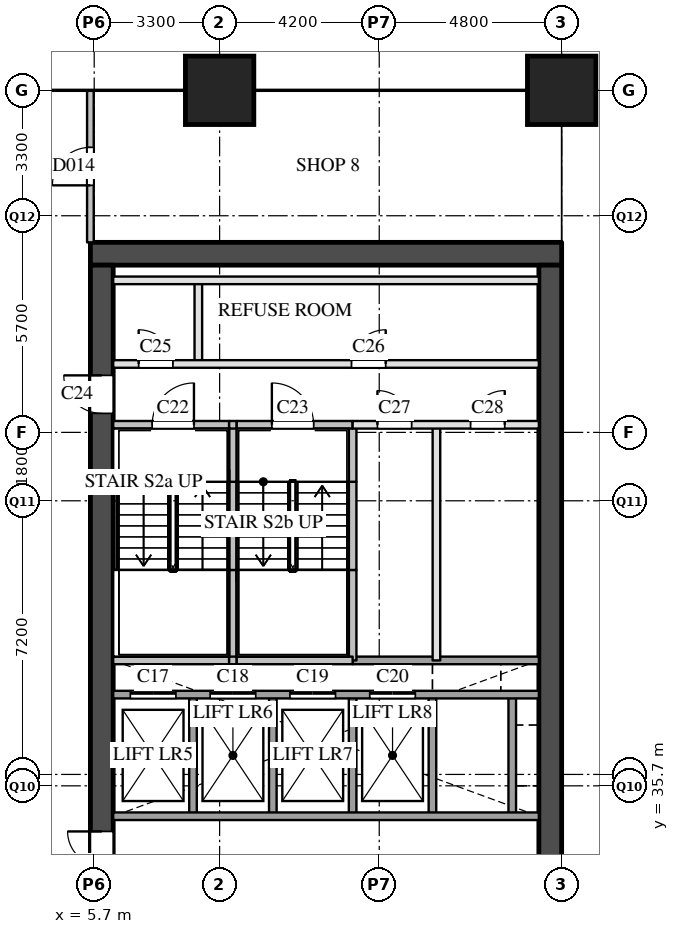
"""IFC4 building model, lengths in metres.
Left out: names, types, materials, properties, quantities, classifications, styles, units other than length and angle.
Written with IfcOpenShell. Run it as: python <this file> out.ifc"""

import sys

from ifc_helpers import new_model, si_unit, direction, frame, frame_2d, origin, origin_2d, place, context, subcontext, project, spatial, rectangle, extrude, element, fill, save


model = new_model("IFC4")
c1 = context("Model", 3, precision=1e-05, world=origin(), true_north=direction((0.0, 1.0)))
c2 = subcontext(c1, "Body", "Model", "MODEL_VIEW")
j1 = project(units=[si_unit("LENGTHUNIT", "METRE"), si_unit("PLANEANGLEUNIT", "RADIAN")], contexts=[c1])
p1 = place(None, origin())
s1 = spatial("IfcSite", under=j1, at=p1, CompositionType="ELEMENT")
p2 = place(p1, origin())
s2 = spatial("IfcBuilding", under=s1, at=p2, CompositionType="ELEMENT")
p3 = place(p2, frame((0.0, 0.0, 8.0)))
s3 = spatial("IfcBuildingStorey", under=s2, at=p3, CompositionType="ELEMENT", Elevation=8.0)
for number, where, z_axis, x_axis in (
    (1, (9.0, 54.0, 0.0), (0.0, 0.0, 1.0), (1.0, 0.0, 0.0)),
    (2, (18.0, 54.0, 0.0), (0.0, 0.0, 1.0), (1.0, 0.0, 0.0)),
):
    element("IfcColumn", number, at=place(p3, frame(where, z_axis=z_axis, x_axis=x_axis)), inside=s3, PredefinedType="COLUMN", context=c2, shape_type="SweptSolid", body=[
        extrude(rectangle(XDim=1.8, YDim=1.8, at=origin_2d()), origin(), (0.0, 0.0, 1.0), 6.0),
    ])
p4 = place(p3, frame((5.6, 49.7, 0.0), z_axis=(0.0, 0.0, 1.0), x_axis=(1.0, 0.0, 0.0)))
e3 = element("IfcWall", 3, at=p4, inside=s3, PredefinedType="SHEAR", context=c2, shape_type="SweptSolid", body=[
    extrude(rectangle(XDim=12.4, YDim=0.6, at=frame_2d((6.2, 0.0))), origin(), (0.0, 0.0, 1.0), 5.59),
])
p5 = place(p3, frame((5.9, 29.1, 0.0), z_axis=(0.0, 0.0, 1.0), x_axis=(0.0, 1.0, 0.0)))
e4 = element("IfcWall", 4, at=p5, inside=s3, PredefinedType="SHEAR", context=c2, shape_type="SweptSolid", body=[
    extrude(rectangle(XDim=20.3, YDim=0.6, at=frame_2d((10.15, 0.0))), origin(), (0.0, 0.0, 1.0), 5.59),
])
p6 = place(p5, frame((3.6, 0.0, 0.0)))
e5 = element("IfcOpeningElement", 5, at=p6, cuts=e4, PredefinedType="OPENING", context=c2, shape_type="SweptSolid", body=[
    extrude(rectangle(XDim=1.8, YDim=2.1, at=frame_2d((0.9, 1.05))), frame((0.0, 0.31, 0.0), z_axis=(0.0, -1.0, 0.0), x_axis=(1.0, 0.0, 0.0)), (0.0, 0.0, 1.0), 0.62),
])
p7 = place(p5, frame((16.4, 0.0, 0.0)))
e6 = element("IfcOpeningElement", 6, at=p7, cuts=e4, PredefinedType="OPENING", context=c2, shape_type="SweptSolid", body=[
    extrude(rectangle(XDim=1.0, YDim=2.1, at=frame_2d((0.5, 1.05))), frame((0.0, 0.31, 0.0), z_axis=(0.0, -1.0, 0.0), x_axis=(1.0, 0.0, 0.0)), (0.0, 0.0, 1.0), 0.62),
])
p8 = place(p3, frame((17.7, 29.1, 0.0), z_axis=(0.0, 0.0, 1.0), x_axis=(0.0, 1.0, 0.0)))
e7 = element("IfcWall", 7, at=p8, inside=s3, PredefinedType="SHEAR", context=c2, shape_type="SweptSolid", body=[
    extrude(rectangle(XDim=20.3, YDim=0.6, at=frame_2d((10.15, 0.0))), origin(), (0.0, 0.0, 1.0), 5.59),
])
p9 = place(p3, frame((8.3, 34.9, 0.0), z_axis=(0.0, 0.0, 1.0), x_axis=(0.0, 1.0, 0.0)))
e8 = element("IfcWall", 8, at=p9, inside=s3, PredefinedType="SOLIDWALL", context=c2, shape_type="SweptSolid", body=[
    extrude(rectangle(XDim=3.2, YDim=0.2, at=frame_2d((1.6, 0.0))), origin(), (0.0, 0.0, 1.0), 5.59),
])
p10 = place(p3, frame((8.44, 46.8, 0.0), z_axis=(0.0, 0.0, 1.0), x_axis=(0.0, 1.0, 0.0)))
e9 = element("IfcWall", 9, at=p10, inside=s3, PredefinedType="PARTITIONING", context=c2, shape_type="SweptSolid", body=[
    extrude(rectangle(XDim=2.2, YDim=0.2, at=frame_2d((1.1, 0.0))), origin(), (0.0, 0.0, 1.0), 5.59),
])
p11 = place(p3, frame((9.35, 39.0, 0.0), z_axis=(0.0, 0.0, 1.0), x_axis=(0.0, 1.0, 0.0)))
e10 = element("IfcWall", 10, at=p11, inside=s3, PredefinedType="SOLIDWALL", context=c2, shape_type="SweptSolid", body=[
    extrude(rectangle(XDim=2.38, YDim=0.2, at=frame_2d((1.19, 0.0))), origin(), (0.0, 0.0, 1.0), 5.59),
])
p12 = place(p3, frame((9.35, 41.38, 0.0), z_axis=(0.0, 0.0, 1.0), x_axis=(0.0, 1.0, 0.0)))
e11 = element("IfcWall", 11, at=p12, inside=s3, PredefinedType="SOLIDWALL", context=c2, shape_type="SweptSolid", body=[
    extrude(rectangle(XDim=2.32, YDim=0.2, at=frame_2d((1.16, 0.0))), origin(), (0.0, 0.0, 1.0), 5.59),
])
p13 = place(p3, frame((9.35, 43.7, 0.0), z_axis=(0.0, 0.0, 1.0), x_axis=(0.0, 1.0, 0.0)))
e12 = element("IfcWall", 12, at=p13, inside=s3, PredefinedType="SOLIDWALL", context=c2, shape_type="SweptSolid", body=[
    extrude(rectangle(XDim=1.5, YDim=0.2, at=frame_2d((0.75, 0.0))), origin(), (0.0, 0.0, 1.0), 5.59),
])
for number, where, z_axis, x_axis in (
    (13, (10.4, 34.9, 0.0), (0.0, 0.0, 1.0), (0.0, 1.0, 0.0)),
    (14, (12.5, 34.9, 0.0), (0.0, 0.0, 1.0), (0.0, 1.0, 0.0)),
):
    element("IfcWall", number, at=place(p3, frame(where, z_axis=z_axis, x_axis=x_axis)), inside=s3, PredefinedType="SOLIDWALL", context=c2, shape_type="SweptSolid", body=[
        extrude(rectangle(XDim=3.2, YDim=0.2, at=frame_2d((1.6, 0.0))), origin(), (0.0, 0.0, 1.0), 5.59),
    ])
p14 = place(p3, frame((12.5, 39.0, 0.0), z_axis=(0.0, 0.0, 1.0), x_axis=(0.0, 1.0, 0.0)))
e15 = element("IfcWall", 15, at=p14, inside=s3, PredefinedType="SOLIDWALL", context=c2, shape_type="SweptSolid", body=[
    extrude(rectangle(XDim=2.38, YDim=0.2, at=frame_2d((1.19, 0.0))), origin(), (0.0, 0.0, 1.0), 5.59),
])
p15 = place(p3, frame((12.5, 41.38, 0.0), z_axis=(0.0, 0.0, 1.0), x_axis=(0.0, 1.0, 0.0)))
e16 = element("IfcWall", 16, at=p15, inside=s3, PredefinedType="SOLIDWALL", context=c2, shape_type="SweptSolid", body=[
    extrude(rectangle(XDim=2.32, YDim=0.2, at=frame_2d((1.16, 0.0))), origin(), (0.0, 0.0, 1.0), 5.59),
])
p16 = place(p3, frame((12.5, 43.7, 0.0), z_axis=(0.0, 0.0, 1.0), x_axis=(0.0, 1.0, 0.0)))
e17 = element("IfcWall", 17, at=p16, inside=s3, PredefinedType="SOLIDWALL", context=c2, shape_type="SweptSolid", body=[
    extrude(rectangle(XDim=1.5, YDim=0.2, at=frame_2d((0.75, 0.0))), origin(), (0.0, 0.0, 1.0), 5.59),
])
p17 = place(p3, frame((14.6, 34.9, 0.0), z_axis=(0.0, 0.0, 1.0), x_axis=(0.0, 1.0, 0.0)))
e18 = element("IfcWall", 18, at=p17, inside=s3, PredefinedType="SOLIDWALL", context=c2, shape_type="SweptSolid", body=[
    extrude(rectangle(XDim=3.2, YDim=0.2, at=frame_2d((1.6, 0.0))), origin(), (0.0, 0.0, 1.0), 5.59),
])
p18 = place(p3, frame((14.705, 39.0, 0.0), z_axis=(0.0, 0.0, 1.0), x_axis=(0.0, 1.0, 0.0)))
e19 = element("IfcWall", 19, at=p18, inside=s3, PredefinedType="PARTITIONING", context=c2, shape_type="SweptSolid", body=[
    extrude(rectangle(XDim=6.2, YDim=0.2, at=frame_2d((3.1, 0.0))), origin(), (0.0, 0.0, 1.0), 5.59),
])
p19 = place(p3, frame((16.7, 34.9, 0.0), z_axis=(0.0, 0.0, 1.0), x_axis=(0.0, 1.0, 0.0)))
e20 = element("IfcWall", 20, at=p19, inside=s3, PredefinedType="SOLIDWALL", context=c2, shape_type="SweptSolid", body=[
    extrude(rectangle(XDim=3.2, YDim=0.2, at=frame_2d((1.6, 0.0))), origin(), (0.0, 0.0, 1.0), 5.59),
])
p20 = place(p3, frame((6.2, 34.9, 0.0), z_axis=(0.0, 0.0, 1.0), x_axis=(1.0, 0.0, 0.0)))
e21 = element("IfcWall", 21, at=p20, inside=s3, PredefinedType="SOLIDWALL", context=c2, shape_type="SweptSolid", body=[
    extrude(rectangle(XDim=11.2, YDim=0.2, at=frame_2d((5.6, 0.0))), origin(), (0.0, 0.0, 1.0), 5.59),
])
p21 = place(p3, frame((6.2, 38.1, 0.0), z_axis=(0.0, 0.0, 1.0), x_axis=(1.0, 0.0, 0.0)))
e22 = element("IfcWall", 22, at=p21, inside=s3, PredefinedType="SOLIDWALL", context=c2, shape_type="SweptSolid", body=[
    extrude(rectangle(XDim=11.2, YDim=0.2, at=frame_2d((5.6, 0.0))), origin(), (0.0, 0.0, 1.0), 5.59),
])
p22 = place(p21, frame((0.45, 0.0, 0.0)))
e23 = element("IfcOpeningElement", 23, at=p22, cuts=e22, PredefinedType="OPENING", context=c2, shape_type="SweptSolid", body=[
    extrude(rectangle(XDim=1.2, YDim=2.1, at=frame_2d((0.6, 1.05))), frame((0.0, 0.11, 0.0), z_axis=(0.0, -1.0, 0.0), x_axis=(1.0, 0.0, 0.0)), (0.0, 0.0, 1.0), 0.22),
])
p23 = place(p21, frame((2.55, 0.0, 0.0)))
e24 = element("IfcOpeningElement", 24, at=p23, cuts=e22, PredefinedType="OPENING", context=c2, shape_type="SweptSolid", body=[
    extrude(rectangle(XDim=1.2, YDim=2.1, at=frame_2d((0.6, 1.05))), frame((0.0, 0.11, 0.0), z_axis=(0.0, -1.0, 0.0), x_axis=(1.0, 0.0, 0.0)), (0.0, 0.0, 1.0), 0.22),
])
p24 = place(p21, frame((4.65, 0.0, 0.0)))
e25 = element("IfcOpeningElement", 25, at=p24, cuts=e22, PredefinedType="OPENING", context=c2, shape_type="SweptSolid", body=[
    extrude(rectangle(XDim=1.2, YDim=2.1, at=frame_2d((0.6, 1.05))), frame((0.0, 0.11, 0.0), z_axis=(0.0, -1.0, 0.0), x_axis=(1.0, 0.0, 0.0)), (0.0, 0.0, 1.0), 0.22),
])
p25 = place(p21, frame((6.75, 0.0, 0.0)))
e26 = element("IfcOpeningElement", 26, at=p25, cuts=e22, PredefinedType="OPENING", context=c2, shape_type="SweptSolid", body=[
    extrude(rectangle(XDim=1.2, YDim=2.1, at=frame_2d((0.6, 1.05))), frame((0.0, 0.11, 0.0), z_axis=(0.0, -1.0, 0.0), x_axis=(1.0, 0.0, 0.0)), (0.0, 0.0, 1.0), 0.22),
])
p26 = place(p3, frame((12.5, 39.0, 0.0), z_axis=(0.0, 0.0, 1.0), x_axis=(1.0, 0.0, 0.0)))
e27 = element("IfcWall", 27, at=p26, inside=s3, PredefinedType="SOLIDWALL", context=c2, shape_type="SweptSolid", body=[
    extrude(rectangle(XDim=4.9, YDim=0.2, at=frame_2d((2.45, 0.0))), origin(), (0.0, 0.0, 1.0), 5.59),
])
p27 = place(p3, frame((6.2, 39.0, 0.0), z_axis=(0.0, 0.0, 1.0), x_axis=(1.0, 0.0, 0.0)))
e28 = element("IfcWall", 28, at=p27, inside=s3, PredefinedType="SOLIDWALL", context=c2, shape_type="SweptSolid", body=[
    extrude(rectangle(XDim=3.05, YDim=0.2, at=frame_2d((1.525, 0.0))), origin(), (0.0, 0.0, 1.0), 5.59),
])
p28 = place(p3, frame((9.25, 39.0, 0.0), z_axis=(0.0, 0.0, 1.0), x_axis=(1.0, 0.0, 0.0)))
e29 = element("IfcWall", 29, at=p28, inside=s3, PredefinedType="SOLIDWALL", context=c2, shape_type="SweptSolid", body=[
    extrude(rectangle(XDim=0.2, YDim=0.2, at=frame_2d((0.1, 0.0))), origin(), (0.0, 0.0, 1.0), 5.59),
])
p29 = place(p3, frame((9.45, 39.0, 0.0), z_axis=(0.0, 0.0, 1.0), x_axis=(1.0, 0.0, 0.0)))
e30 = element("IfcWall", 30, at=p29, inside=s3, PredefinedType="SOLIDWALL", context=c2, shape_type="SweptSolid", body=[
    extrude(rectangle(XDim=3.05, YDim=0.2, at=frame_2d((1.525, 0.0))), origin(), (0.0, 0.0, 1.0), 5.59),
])
p30 = place(p3, frame((12.5, 45.2, 0.0), z_axis=(0.0, 0.0, 1.0), x_axis=(1.0, 0.0, 0.0)))
e31 = element("IfcWall", 31, at=p30, inside=s3, PredefinedType="PARTITIONING", context=c2, shape_type="SweptSolid", body=[
    extrude(rectangle(XDim=4.9, YDim=0.2, at=frame_2d((2.45, 0.0))), origin(), (0.0, 0.0, 1.0), 5.59),
])
p31 = place(p30, frame((0.653, 0.0, 0.0)))
e32 = element("IfcOpeningElement", 32, at=p31, cuts=e31, PredefinedType="OPENING", context=c2, shape_type="SweptSolid", body=[
    extrude(rectangle(XDim=0.9, YDim=2.1, at=frame_2d((0.45, 1.05))), frame((0.0, 0.11, 0.0), z_axis=(0.0, -1.0, 0.0), x_axis=(1.0, 0.0, 0.0)), (0.0, 0.0, 1.0), 0.22),
])
p32 = place(p30, frame((3.103, 0.0, 0.0)))
e33 = element("IfcOpeningElement", 33, at=p32, cuts=e31, PredefinedType="OPENING", context=c2, shape_type="SweptSolid", body=[
    extrude(rectangle(XDim=0.9, YDim=2.1, at=frame_2d((0.45, 1.05))), frame((0.0, 0.11, 0.0), z_axis=(0.0, -1.0, 0.0), x_axis=(1.0, 0.0, 0.0)), (0.0, 0.0, 1.0), 0.22),
])
p33 = place(p3, frame((6.2, 45.2, 0.0), z_axis=(0.0, 0.0, 1.0), x_axis=(1.0, 0.0, 0.0)))
e34 = element("IfcWall", 34, at=p33, inside=s3, PredefinedType="SOLIDWALL", context=c2, shape_type="SweptSolid", body=[
    extrude(rectangle(XDim=3.05, YDim=0.2, at=frame_2d((1.525, 0.0))), origin(), (0.0, 0.0, 1.0), 5.59),
])
p34 = place(p33, frame((1.025, 0.0, 0.0)))
e35 = element("IfcOpeningElement", 35, at=p34, cuts=e34, PredefinedType="OPENING", context=c2, shape_type="SweptSolid", body=[
    extrude(rectangle(XDim=1.1, YDim=2.1, at=frame_2d((0.55, 1.05))), frame((0.0, 0.11, 0.0), z_axis=(0.0, -1.0, 0.0), x_axis=(1.0, 0.0, 0.0)), (0.0, 0.0, 1.0), 0.22),
])
p35 = place(p3, frame((9.25, 45.2, 0.0), z_axis=(0.0, 0.0, 1.0), x_axis=(1.0, 0.0, 0.0)))
e36 = element("IfcWall", 36, at=p35, inside=s3, PredefinedType="SOLIDWALL", context=c2, shape_type="SweptSolid", body=[
    extrude(rectangle(XDim=0.2, YDim=0.2, at=frame_2d((0.1, 0.0))), origin(), (0.0, 0.0, 1.0), 5.59),
])
p36 = place(p3, frame((9.45, 45.2, 0.0), z_axis=(0.0, 0.0, 1.0), x_axis=(1.0, 0.0, 0.0)))
e37 = element("IfcWall", 37, at=p36, inside=s3, PredefinedType="SOLIDWALL", context=c2, shape_type="SweptSolid", body=[
    extrude(rectangle(XDim=3.05, YDim=0.2, at=frame_2d((1.525, 0.0))), origin(), (0.0, 0.0, 1.0), 5.59),
])
p37 = place(p36, frame((0.925, 0.0, 0.0)))
e38 = element("IfcOpeningElement", 38, at=p37, cuts=e37, PredefinedType="OPENING", context=c2, shape_type="SweptSolid", body=[
    extrude(rectangle(XDim=1.1, YDim=2.1, at=frame_2d((0.55, 1.05))), frame((0.0, 0.11, 0.0), z_axis=(0.0, -1.0, 0.0), x_axis=(1.0, 0.0, 0.0)), (0.0, 0.0, 1.0), 0.22),
])
p38 = place(p3, frame((6.2, 46.8, 0.0), z_axis=(0.0, 0.0, 1.0), x_axis=(1.0, 0.0, 0.0)))
e39 = element("IfcWall", 39, at=p38, inside=s3, PredefinedType="PARTITIONING", context=c2, shape_type="SweptSolid", body=[
    extrude(rectangle(XDim=11.2, YDim=0.2, at=frame_2d((5.6, 0.0))), origin(), (0.0, 0.0, 1.0), 5.59),
])
p39 = place(p38, frame((0.67, 0.0, 0.0)))
e40 = element("IfcOpeningElement", 40, at=p39, cuts=e39, PredefinedType="OPENING", context=c2, shape_type="SweptSolid", body=[
    extrude(rectangle(XDim=0.9, YDim=2.1, at=frame_2d((0.45, 1.05))), frame((0.0, 0.11, 0.0), z_axis=(0.0, -1.0, 0.0), x_axis=(1.0, 0.0, 0.0)), (0.0, 0.0, 1.0), 0.22),
])
p40 = place(p38, frame((6.27, 0.0, 0.0)))
e41 = element("IfcOpeningElement", 41, at=p40, cuts=e39, PredefinedType="OPENING", context=c2, shape_type="SweptSolid", body=[
    extrude(rectangle(XDim=0.9, YDim=2.1, at=frame_2d((0.45, 1.05))), frame((0.0, 0.11, 0.0), z_axis=(0.0, -1.0, 0.0), x_axis=(1.0, 0.0, 0.0)), (0.0, 0.0, 1.0), 0.22),
])
p41 = place(p3, frame((6.2, 49.0, 0.0), z_axis=(0.0, 0.0, 1.0), x_axis=(1.0, 0.0, 0.0)))
e42 = element("IfcWall", 42, at=p41, inside=s3, PredefinedType="PARTITIONING", context=c2, shape_type="SweptSolid", body=[
    extrude(rectangle(XDim=11.2, YDim=0.2, at=frame_2d((5.6, 0.0))), origin(), (0.0, 0.0, 1.0), 5.59),
])
p42 = place(p3, frame((5.6, 50.0, 0.0), z_axis=(0.0, 0.0, 1.0), x_axis=(0.0, 1.0, 0.0)))
e43 = element("IfcWall", 43, at=p42, inside=s3, PredefinedType="PARTITIONING", context=c2, shape_type="SweptSolid", body=[
    extrude(rectangle(XDim=4.0, YDim=0.175, at=frame_2d((2.0, 0.0))), origin(), (0.0, 0.0, 1.0), 4.59),
])
p43 = place(p42, frame((1.5, 0.0, 0.0)))
e44 = element("IfcOpeningElement", 44, at=p43, cuts=e43, PredefinedType="OPENING", context=c2, shape_type="SweptSolid", body=[
    extrude(rectangle(XDim=1.0, YDim=2.1, at=frame_2d((0.5, 1.05))), frame((0.0, 0.097, 0.0), z_axis=(0.0, -1.0, 0.0), x_axis=(1.0, 0.0, 0.0)), (0.0, 0.0, 1.0), 0.195),
])
p44 = place(p22, origin())
e45 = element("IfcDoor", 45, at=p44, inside=s3, OperationType="SLIDING_TO_LEFT", PredefinedType="DOOR", context=c2, shape_type="SweptSolid", body=[
    extrude(rectangle(XDim=1.2, YDim=2.1, at=frame_2d((0.6, 1.05))), frame((0.0, 0.025, 0.0), z_axis=(0.0, -1.0, 0.0), x_axis=(1.0, 0.0, 0.0)), (0.0, 0.0, 1.0), 0.05),
])
fill(e23, e45)
p45 = place(p23, origin())
e46 = element("IfcDoor", 46, at=p45, inside=s3, OperationType="SLIDING_TO_LEFT", PredefinedType="DOOR", context=c2, shape_type="SweptSolid", body=[
    extrude(rectangle(XDim=1.2, YDim=2.1, at=frame_2d((0.6, 1.05))), frame((0.0, 0.025, 0.0), z_axis=(0.0, -1.0, 0.0), x_axis=(1.0, 0.0, 0.0)), (0.0, 0.0, 1.0), 0.05),
])
fill(e24, e46)
p46 = place(p24, origin())
e47 = element("IfcDoor", 47, at=p46, inside=s3, OperationType="SLIDING_TO_LEFT", PredefinedType="DOOR", context=c2, shape_type="SweptSolid", body=[
    extrude(rectangle(XDim=1.2, YDim=2.1, at=frame_2d((0.6, 1.05))), frame((0.0, 0.025, 0.0), z_axis=(0.0, -1.0, 0.0), x_axis=(1.0, 0.0, 0.0)), (0.0, 0.0, 1.0), 0.05),
])
fill(e25, e47)
p47 = place(p25, origin())
e48 = element("IfcDoor", 48, at=p47, inside=s3, OperationType="SLIDING_TO_LEFT", PredefinedType="DOOR", context=c2, shape_type="SweptSolid", body=[
    extrude(rectangle(XDim=1.2, YDim=2.1, at=frame_2d((0.6, 1.05))), frame((0.0, 0.025, 0.0), z_axis=(0.0, -1.0, 0.0), x_axis=(1.0, 0.0, 0.0)), (0.0, 0.0, 1.0), 0.05),
])
fill(e26, e48)
p48 = place(p6, origin())
e49 = element("IfcDoor", 49, at=p48, inside=s3, OperationType="DOUBLE_DOOR_SINGLE_SWING", PredefinedType="DOOR", context=c2, shape_type="SweptSolid", body=[
    extrude(rectangle(XDim=1.8, YDim=2.1, at=frame_2d((0.9, 1.05))), frame((0.0, 0.025, 0.0), z_axis=(0.0, -1.0, 0.0), x_axis=(1.0, 0.0, 0.0)), (0.0, 0.0, 1.0), 0.05),
])
fill(e5, e49)
p49 = place(p34, origin())
e50 = element("IfcDoor", 50, at=p49, inside=s3, OperationType="SINGLE_SWING_RIGHT", PredefinedType="DOOR", context=c2, shape_type="SweptSolid", body=[
    extrude(rectangle(XDim=1.1, YDim=2.1, at=frame_2d((0.55, 1.05))), frame((0.0, 0.025, 0.0), z_axis=(0.0, -1.0, 0.0), x_axis=(1.0, 0.0, 0.0)), (0.0, 0.0, 1.0), 0.05),
])
fill(e35, e50)
p50 = place(p37, origin())
e51 = element("IfcDoor", 51, at=p50, inside=s3, OperationType="SINGLE_SWING_LEFT", PredefinedType="DOOR", context=c2, shape_type="SweptSolid", body=[
    extrude(rectangle(XDim=1.1, YDim=2.1, at=frame_2d((0.55, 1.05))), frame((0.0, 0.025, 0.0), z_axis=(0.0, -1.0, 0.0), x_axis=(1.0, 0.0, 0.0)), (0.0, 0.0, 1.0), 0.05),
])
fill(e38, e51)
p51 = place(p7, origin())
e52 = element("IfcDoor", 52, at=p51, inside=s3, OperationType="SINGLE_SWING_RIGHT", PredefinedType="DOOR", context=c2, shape_type="SweptSolid", body=[
    extrude(rectangle(XDim=1.0, YDim=2.1, at=frame_2d((0.5, 1.05))), frame((0.0, 0.025, 0.0), z_axis=(0.0, -1.0, 0.0), x_axis=(1.0, 0.0, 0.0)), (0.0, 0.0, 1.0), 0.05),
])
fill(e6, e52)
p52 = place(p39, origin())
e53 = element("IfcDoor", 53, at=p52, inside=s3, OperationType="SINGLE_SWING_LEFT", PredefinedType="DOOR", context=c2, shape_type="SweptSolid", body=[
    extrude(rectangle(XDim=0.9, YDim=2.1, at=frame_2d((0.45, 1.05))), frame((0.0, 0.025, 0.0), z_axis=(0.0, -1.0, 0.0), x_axis=(1.0, 0.0, 0.0)), (0.0, 0.0, 1.0), 0.05),
])
fill(e40, e53)
p53 = place(p40, origin())
e54 = element("IfcDoor", 54, at=p53, inside=s3, OperationType="SINGLE_SWING_RIGHT", PredefinedType="DOOR", context=c2, shape_type="SweptSolid", body=[
    extrude(rectangle(XDim=0.9, YDim=2.1, at=frame_2d((0.45, 1.05))), frame((0.0, 0.025, 0.0), z_axis=(0.0, -1.0, 0.0), x_axis=(1.0, 0.0, 0.0)), (0.0, 0.0, 1.0), 0.05),
])
fill(e41, e54)
p54 = place(p31, origin())
e55 = element("IfcDoor", 55, at=p54, inside=s3, OperationType="SINGLE_SWING_LEFT", PredefinedType="DOOR", context=c2, shape_type="SweptSolid", body=[
    extrude(rectangle(XDim=0.9, YDim=2.1, at=frame_2d((0.45, 1.05))), frame((0.0, 0.025, 0.0), z_axis=(0.0, -1.0, 0.0), x_axis=(1.0, 0.0, 0.0)), (0.0, 0.0, 1.0), 0.05),
])
fill(e32, e55)
p55 = place(p32, origin())
e56 = element("IfcDoor", 56, at=p55, inside=s3, OperationType="SINGLE_SWING_RIGHT", PredefinedType="DOOR", context=c2, shape_type="SweptSolid", body=[
    extrude(rectangle(XDim=0.9, YDim=2.1, at=frame_2d((0.45, 1.05))), frame((0.0, 0.025, 0.0), z_axis=(0.0, -1.0, 0.0), x_axis=(1.0, 0.0, 0.0)), (0.0, 0.0, 1.0), 0.05),
])
fill(e33, e56)
p56 = place(p43, origin())
e57 = element("IfcDoor", 57, at=p56, inside=s3, OperationType="SINGLE_SWING_LEFT", PredefinedType="DOOR", context=c2, shape_type="SweptSolid", body=[
    extrude(rectangle(XDim=1.0, YDim=2.1, at=frame_2d((0.5, 1.05))), frame((0.0, 0.025, 0.0), z_axis=(0.0, -1.0, 0.0), x_axis=(1.0, 0.0, 0.0)), (0.0, 0.0, 1.0), 0.05),
])
fill(e44, e57)
save(model, sys.argv[1])
